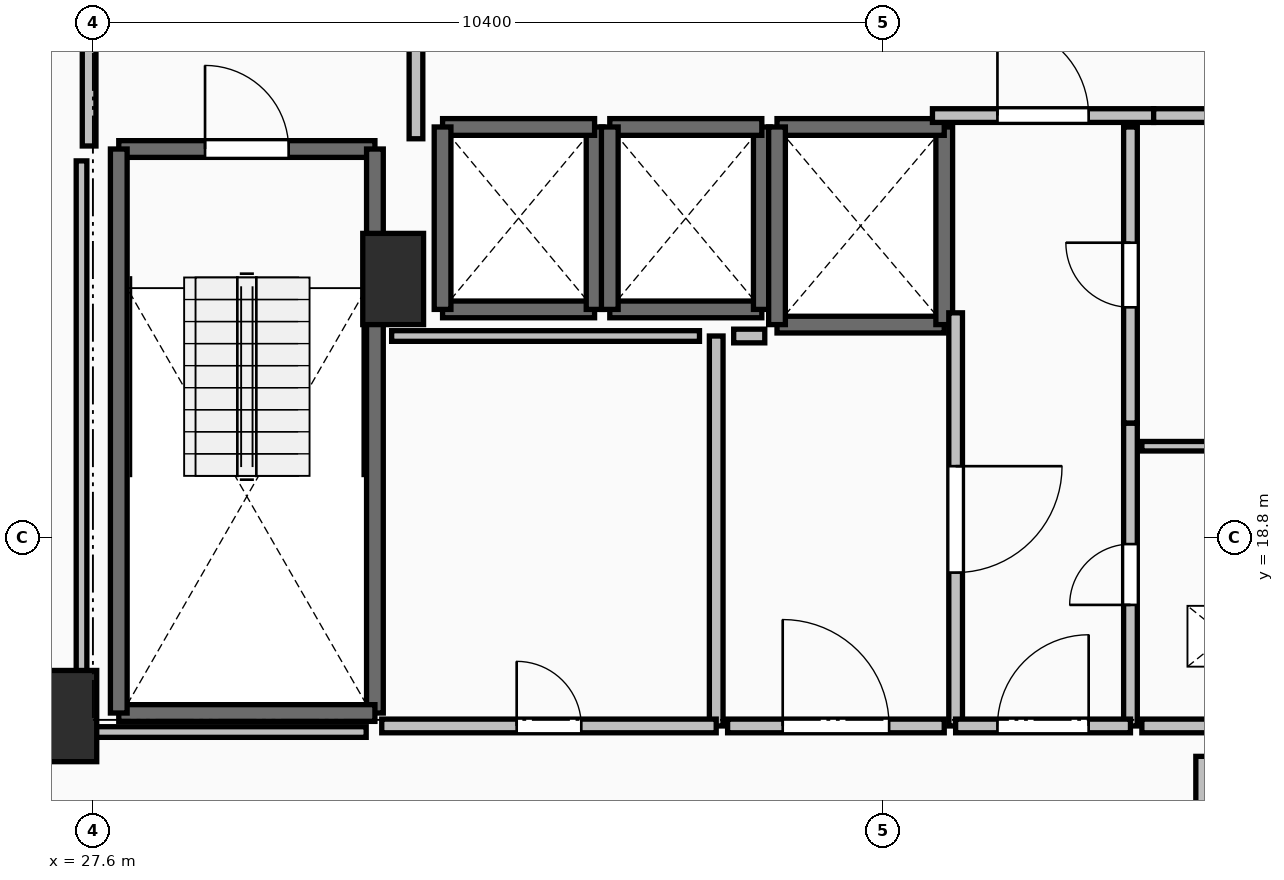
"""IFC4 building model, lengths in metres.
Left out: names, types, materials, properties, quantities, classifications, styles, units other than length and angle.
Written with IfcOpenShell. Run it as: python <this file> out.ifc"""

import sys

from ifc_helpers import new_model, si_unit, direction, frame, frame_2d, origin, origin_2d, place, context, subcontext, project, spatial, rectangle, extrude, element, fill, save


model = new_model("IFC4")
c1 = context("Model", 3, precision=1e-05, world=origin(), true_north=direction((0.0, 1.0)))
c2 = subcontext(c1, "Body", "Model", "MODEL_VIEW")
j1 = project(units=[si_unit("LENGTHUNIT", "METRE"), si_unit("PLANEANGLEUNIT", "RADIAN")], contexts=[c1])
p1 = place(None, origin())
s1 = spatial("IfcSite", under=j1, at=p1, CompositionType="ELEMENT")
p2 = place(p1, origin())
s2 = spatial("IfcBuilding", under=s1, at=p2, CompositionType="ELEMENT")
p3 = place(p2, frame((0.0, 0.0, 52.0)))
s3 = spatial("IfcBuildingStorey", under=s2, at=p3, CompositionType="ELEMENT", Elevation=52.0)
for number, where, z_axis, x_axis in (
    (1, (27.25, 16.45, 0.0), (0.0, 0.0, 1.0), (1.0, 0.0, 0.0)),
    (2, (31.55, 22.2, 0.0), (0.0, 0.0, 1.0), (1.0, 0.0, 0.0)),
):
    element("IfcColumn", number, at=place(p3, frame(where, z_axis=z_axis, x_axis=x_axis)), inside=s3, PredefinedType="PILASTER", context=c2, shape_type="SweptSolid", body=[
        extrude(rectangle(XDim=0.8, YDim=1.2, at=origin_2d()), origin(), (0.0, 0.0, 1.0), 3.5),
    ])
p4 = place(p3, frame((27.94, 23.91, 0.0), z_axis=(0.0, 0.0, 1.0), x_axis=(1.0, 0.0, 0.0)))
e3 = element("IfcWall", 3, at=p4, inside=s3, PredefinedType="SOLIDWALL", context=c2, shape_type="SweptSolid", body=[
    extrude(rectangle(XDim=3.37, YDim=0.22, at=frame_2d((1.685, 0.0))), origin(), (0.0, 0.0, 1.0), 3.24),
])
p5 = place(p4, frame((1.135, 0.0, 0.0)))
e4 = element("IfcOpeningElement", 4, at=p5, cuts=e3, PredefinedType="OPENING", context=c2, shape_type="SweptSolid", body=[
    extrude(rectangle(XDim=1.1, YDim=2.15, at=frame_2d((0.55, 1.075))), frame((0.0, 0.125, 0.0), z_axis=(0.0, -1.0, 0.0), x_axis=(1.0, 0.0, 0.0)), (0.0, 0.0, 1.0), 0.25),
])
p6 = place(p3, frame((31.31, 23.91, 0.0), z_axis=(0.0, 0.0, 1.0), x_axis=(0.0, -1.0, 0.0)))
e5 = element("IfcWall", 5, at=p6, inside=s3, PredefinedType="SOLIDWALL", context=c2, shape_type="SweptSolid", body=[
    extrude(rectangle(XDim=7.42, YDim=0.22, at=frame_2d((3.71, 0.0))), origin(), (0.0, 0.0, 1.0), 3.24),
])
p7 = place(p3, frame((31.31, 16.49, 0.0), z_axis=(0.0, 0.0, 1.0), x_axis=(-1.0, 0.0, 0.0)))
e6 = element("IfcWall", 6, at=p7, inside=s3, PredefinedType="SOLIDWALL", context=c2, shape_type="SweptSolid", body=[
    extrude(rectangle(XDim=3.37, YDim=0.22, at=frame_2d((1.685, 0.0))), origin(), (0.0, 0.0, 1.0), 3.24),
])
p8 = place(p3, frame((27.94, 16.49, 0.0), z_axis=(0.0, 0.0, 1.0), x_axis=(0.0, 1.0, 0.0)))
e7 = element("IfcWall", 7, at=p8, inside=s3, PredefinedType="SOLIDWALL", context=c2, shape_type="SweptSolid", body=[
    extrude(rectangle(XDim=7.42, YDim=0.22, at=frame_2d((3.71, 0.0))), origin(), (0.0, 0.0, 1.0), 3.24),
])
p9 = place(p3, frame((32.2, 21.8, 0.0), z_axis=(0.0, 0.0, 1.0), x_axis=(1.0, 0.0, 0.0)))
e8 = element("IfcWall", 8, at=p9, inside=s3, PredefinedType="SOLIDWALL", context=c2, shape_type="SweptSolid", body=[
    extrude(rectangle(XDim=2.0, YDim=0.22, at=frame_2d((1.0, 0.0))), origin(), (0.0, 0.0, 1.0), 3.24),
])
p10 = place(p3, frame((34.2, 21.8, 0.0), z_axis=(0.0, 0.0, 1.0), x_axis=(0.0, 1.0, 0.0)))
e9 = element("IfcWall", 9, at=p10, inside=s3, PredefinedType="SOLIDWALL", context=c2, shape_type="SweptSolid", body=[
    extrude(rectangle(XDim=2.4, YDim=0.22, at=frame_2d((1.2, 0.0))), origin(), (0.0, 0.0, 1.0), 3.24),
])
p11 = place(p3, frame((34.2, 24.2, 0.0), z_axis=(0.0, 0.0, 1.0), x_axis=(-1.0, 0.0, 0.0)))
e10 = element("IfcWall", 10, at=p11, inside=s3, PredefinedType="SOLIDWALL", context=c2, shape_type="SweptSolid", body=[
    extrude(rectangle(XDim=2.0, YDim=0.22, at=frame_2d((1.0, 0.0))), origin(), (0.0, 0.0, 1.0), 3.24),
])
p12 = place(p3, frame((32.2, 24.2, 0.0), z_axis=(0.0, 0.0, 1.0), x_axis=(0.0, -1.0, 0.0)))
e11 = element("IfcWall", 11, at=p12, inside=s3, PredefinedType="SOLIDWALL", context=c2, shape_type="SweptSolid", body=[
    extrude(rectangle(XDim=2.4, YDim=0.22, at=frame_2d((1.2, 0.0))), origin(), (0.0, 0.0, 1.0), 3.24),
])
p13 = place(p3, frame((34.4, 21.8, 0.0), z_axis=(0.0, 0.0, 1.0), x_axis=(1.0, 0.0, 0.0)))
e12 = element("IfcWall", 12, at=p13, inside=s3, PredefinedType="SOLIDWALL", context=c2, shape_type="SweptSolid", body=[
    extrude(rectangle(XDim=2.0, YDim=0.22, at=frame_2d((1.0, 0.0))), origin(), (0.0, 0.0, 1.0), 3.24),
])
p14 = place(p3, frame((36.4, 21.8, 0.0), z_axis=(0.0, 0.0, 1.0), x_axis=(0.0, 1.0, 0.0)))
e13 = element("IfcWall", 13, at=p14, inside=s3, PredefinedType="SOLIDWALL", context=c2, shape_type="SweptSolid", body=[
    extrude(rectangle(XDim=2.4, YDim=0.22, at=frame_2d((1.2, 0.0))), origin(), (0.0, 0.0, 1.0), 3.24),
])
p15 = place(p3, frame((36.4, 24.2, 0.0), z_axis=(0.0, 0.0, 1.0), x_axis=(-1.0, 0.0, 0.0)))
e14 = element("IfcWall", 14, at=p15, inside=s3, PredefinedType="SOLIDWALL", context=c2, shape_type="SweptSolid", body=[
    extrude(rectangle(XDim=2.0, YDim=0.22, at=frame_2d((1.0, 0.0))), origin(), (0.0, 0.0, 1.0), 3.24),
])
p16 = place(p3, frame((34.4, 24.2, 0.0), z_axis=(0.0, 0.0, 1.0), x_axis=(0.0, -1.0, 0.0)))
e15 = element("IfcWall", 15, at=p16, inside=s3, PredefinedType="SOLIDWALL", context=c2, shape_type="SweptSolid", body=[
    extrude(rectangle(XDim=2.4, YDim=0.22, at=frame_2d((1.2, 0.0))), origin(), (0.0, 0.0, 1.0), 3.24),
])
p17 = place(p3, frame((36.6, 21.6, 0.0), z_axis=(0.0, 0.0, 1.0), x_axis=(1.0, 0.0, 0.0)))
e16 = element("IfcWall", 16, at=p17, inside=s3, PredefinedType="SOLIDWALL", context=c2, shape_type="SweptSolid", body=[
    extrude(rectangle(XDim=2.2, YDim=0.22, at=frame_2d((1.1, 0.0))), origin(), (0.0, 0.0, 1.0), 3.24),
])
p18 = place(p3, frame((38.8, 21.6, 0.0), z_axis=(0.0, 0.0, 1.0), x_axis=(0.0, 1.0, 0.0)))
e17 = element("IfcWall", 17, at=p18, inside=s3, PredefinedType="SOLIDWALL", context=c2, shape_type="SweptSolid", body=[
    extrude(rectangle(XDim=2.6, YDim=0.22, at=frame_2d((1.3, 0.0))), origin(), (0.0, 0.0, 1.0), 3.24),
])
p19 = place(p3, frame((38.8, 24.2, 0.0), z_axis=(0.0, 0.0, 1.0), x_axis=(-1.0, 0.0, 0.0)))
e18 = element("IfcWall", 18, at=p19, inside=s3, PredefinedType="SOLIDWALL", context=c2, shape_type="SweptSolid", body=[
    extrude(rectangle(XDim=2.2, YDim=0.22, at=frame_2d((1.1, 0.0))), origin(), (0.0, 0.0, 1.0), 3.24),
])
p20 = place(p3, frame((36.6, 24.2, 0.0), z_axis=(0.0, 0.0, 1.0), x_axis=(0.0, -1.0, 0.0)))
e19 = element("IfcWall", 19, at=p20, inside=s3, PredefinedType="SOLIDWALL", context=c2, shape_type="SweptSolid", body=[
    extrude(rectangle(XDim=2.6, YDim=0.22, at=frame_2d((1.3, 0.0))), origin(), (0.0, 0.0, 1.0), 3.24),
])
p21 = place(p3, frame((31.85, 24.045, 0.0), z_axis=(0.0, 0.0, 1.0), x_axis=(0.0, 1.0, 0.0)))
e20 = element("IfcWall", 20, at=p21, inside=s3, PredefinedType="PARTITIONING", context=c2, shape_type="SweptSolid", body=[
    extrude(rectangle(XDim=3.91, YDim=0.18, at=frame_2d((1.955, 0.0))), origin(), (0.0, 0.0, 1.0), 3.24),
])
p22 = place(p21, frame((1.355, 0.0, 0.0)))
e21 = element("IfcOpeningElement", 21, at=p22, cuts=e20, PredefinedType="OPENING", context=c2, shape_type="SweptSolid", body=[
    extrude(rectangle(XDim=1.2, YDim=2.15, at=frame_2d((0.6, 1.075))), frame((0.0, 0.105, 0.0), z_axis=(0.0, -1.0, 0.0), x_axis=(1.0, 0.0, 0.0)), (0.0, 0.0, 1.0), 0.21),
])
p23 = place(p3, frame((27.55, 28.0, 0.0), z_axis=(0.0, 0.0, 1.0), x_axis=(0.0, -1.0, 0.0)))
e22 = element("IfcWall", 22, at=p23, inside=s3, PredefinedType="PARTITIONING", context=c2, shape_type="SweptSolid", body=[
    extrude(rectangle(XDim=4.05, YDim=0.18, at=frame_2d((2.025, 0.0))), origin(), (0.0, 0.0, 1.0), 3.24),
])
p24 = place(p23, frame((1.425, 0.0, 0.0)))
e23 = element("IfcOpeningElement", 23, at=p24, cuts=e22, PredefinedType="OPENING", context=c2, shape_type="SweptSolid", body=[
    extrude(rectangle(XDim=1.2, YDim=2.15, at=frame_2d((0.6, 1.075))), frame((0.0, 0.105, 0.0), z_axis=(0.0, -1.0, 0.0), x_axis=(1.0, 0.0, 0.0)), (0.0, 0.0, 1.0), 0.21),
])
p25 = place(p3, frame((38.645, 24.35, 0.0), z_axis=(0.0, 0.0, 1.0), x_axis=(1.0, 0.0, 0.0)))
e24 = element("IfcWall", 24, at=p25, inside=s3, PredefinedType="PARTITIONING", context=c2, shape_type="SweptSolid", body=[
    extrude(rectangle(XDim=2.91, YDim=0.18, at=frame_2d((1.455, 0.0))), origin(), (0.0, 0.0, 1.0), 3.24),
])
p26 = place(p25, frame((0.855, 0.0, 0.0)))
e25 = element("IfcOpeningElement", 25, at=p26, cuts=e24, PredefinedType="OPENING", context=c2, shape_type="SweptSolid", body=[
    extrude(rectangle(XDim=1.2, YDim=2.15, at=frame_2d((0.6, 1.075))), frame((0.0, 0.105, 0.0), z_axis=(0.0, -1.0, 0.0), x_axis=(1.0, 0.0, 0.0)), (0.0, 0.0, 1.0), 0.21),
])
p27 = place(p3, frame((41.555, 24.35, 0.0), z_axis=(0.0, 0.0, 1.0), x_axis=(1.0, 0.0, 0.0)))
e26 = element("IfcWall", 26, at=p27, inside=s3, PredefinedType="PARTITIONING", context=c2, shape_type="SweptSolid", body=[
    extrude(rectangle(XDim=2.445, YDim=0.18, at=frame_2d((1.223, 0.0))), origin(), (0.0, 0.0, 1.0), 3.24),
])
p28 = place(p27, frame((0.798, 0.0, 0.0)))
e27 = element("IfcOpeningElement", 27, at=p28, cuts=e26, PredefinedType="OPENING", context=c2, shape_type="SweptSolid", body=[
    extrude(rectangle(XDim=0.85, YDim=2.1, at=frame_2d((0.425, 1.05))), frame((0.0, 0.105, 0.0), z_axis=(0.0, -1.0, 0.0), x_axis=(1.0, 0.0, 0.0)), (0.0, 0.0, 1.0), 0.21),
])
p29 = place(p3, frame((41.25, 16.32, 0.0), z_axis=(0.0, 0.0, 1.0), x_axis=(0.0, 1.0, 0.0)))
e28 = element("IfcWall", 28, at=p29, inside=s3, PredefinedType="PARTITIONING", context=c2, shape_type="SweptSolid", body=[
    extrude(rectangle(XDim=3.985, YDim=0.18, at=frame_2d((1.992, 0.0))), origin(), (0.0, 0.0, 1.0), 3.24),
])
p30 = place(p29, frame((1.593, 0.0, 0.0)))
e29 = element("IfcOpeningElement", 29, at=p30, cuts=e28, PredefinedType="OPENING", context=c2, shape_type="SweptSolid", body=[
    extrude(rectangle(XDim=0.8, YDim=2.05, at=frame_2d((0.4, 1.025))), frame((0.0, 0.105, 0.0), z_axis=(0.0, -1.0, 0.0), x_axis=(1.0, 0.0, 0.0)), (0.0, 0.0, 1.0), 0.21),
])
p31 = place(p3, frame((41.25, 20.305, 0.0), z_axis=(0.0, 0.0, 1.0), x_axis=(0.0, 1.0, 0.0)))
e30 = element("IfcWall", 30, at=p31, inside=s3, PredefinedType="PARTITIONING", context=c2, shape_type="SweptSolid", body=[
    extrude(rectangle(XDim=3.895, YDim=0.18, at=frame_2d((1.948, 0.0))), origin(), (0.0, 0.0, 1.0), 3.24),
])
p32 = place(p31, frame((1.522, 0.0, 0.0)))
e31 = element("IfcOpeningElement", 31, at=p32, cuts=e30, PredefinedType="OPENING", context=c2, shape_type="SweptSolid", body=[
    extrude(rectangle(XDim=0.85, YDim=2.1, at=frame_2d((0.425, 1.05))), frame((0.0, 0.105, 0.0), z_axis=(0.0, -1.0, 0.0), x_axis=(1.0, 0.0, 0.0)), (0.0, 0.0, 1.0), 0.21),
])
p33 = place(p3, frame((38.95, 21.755, 0.0), z_axis=(0.0, 0.0, 1.0), x_axis=(0.0, -1.0, 0.0)))
e32 = element("IfcWall", 32, at=p33, inside=s3, PredefinedType="PARTITIONING", context=c2, shape_type="SweptSolid", body=[
    extrude(rectangle(XDim=5.435, YDim=0.18, at=frame_2d((2.717, 0.0))), origin(), (0.0, 0.0, 1.0), 3.24),
])
p34 = place(p33, frame((2.018, 0.0, 0.0)))
e33 = element("IfcOpeningElement", 33, at=p34, cuts=e32, PredefinedType="OPENING", context=c2, shape_type="SweptSolid", body=[
    extrude(rectangle(XDim=1.4, YDim=2.2, at=frame_2d((0.7, 1.1))), frame((0.0, 0.105, 0.0), z_axis=(0.0, -1.0, 0.0), x_axis=(1.0, 0.0, 0.0)), (0.0, 0.0, 1.0), 0.21),
])
p35 = place(p3, frame((38.95, 16.32, 0.0), z_axis=(0.0, 0.0, 1.0), x_axis=(1.0, 0.0, 0.0)))
e34 = element("IfcWall", 34, at=p35, inside=s3, PredefinedType="PARTITIONING", context=c2, shape_type="SweptSolid", body=[
    extrude(rectangle(XDim=2.3, YDim=0.18, at=frame_2d((1.15, 0.0))), origin(), (0.0, 0.0, 1.0), 3.24),
])
p36 = place(p35, frame((0.55, 0.0, 0.0)))
e35 = element("IfcOpeningElement", 35, at=p36, cuts=e34, PredefinedType="OPENING", context=c2, shape_type="SweptSolid", body=[
    extrude(rectangle(XDim=1.2, YDim=2.15, at=frame_2d((0.6, 1.075))), frame((0.0, 0.105, 0.0), z_axis=(0.0, -1.0, 0.0), x_axis=(1.0, 0.0, 0.0)), (0.0, 0.0, 1.0), 0.21),
])
p37 = place(p3, frame((44.6, 20.0, 0.0), z_axis=(0.0, 0.0, 1.0), x_axis=(-1.0, 0.0, 0.0)))
e36 = element("IfcWall", 36, at=p37, inside=s3, PredefinedType="PARTITIONING", context=c2, shape_type="SweptSolid", body=[
    extrude(rectangle(XDim=3.2, YDim=0.125, at=frame_2d((1.6, 0.0))), origin(), (0.0, 0.0, 1.0), 3.24),
])
p38 = place(p3, frame((41.4, 16.32, 0.0), z_axis=(0.0, 0.0, 1.0), x_axis=(1.0, 0.0, 0.0)))
e37 = element("IfcWall", 37, at=p38, inside=s3, PredefinedType="PARTITIONING", context=c2, shape_type="SweptSolid", body=[
    extrude(rectangle(XDim=3.2, YDim=0.18, at=frame_2d((1.6, 0.0))), origin(), (0.0, 0.0, 1.0), 3.24),
])
p39 = place(p38, frame((1.2, 0.0, 0.0)))
e38 = element("IfcOpeningElement", 38, at=p39, cuts=e37, PredefinedType="OPENING", context=c2, shape_type="SweptSolid", body=[
    extrude(rectangle(XDim=0.8, YDim=2.05, at=frame_2d((0.4, 1.025))), frame((0.0, 0.105, 0.0), z_axis=(0.0, -1.0, 0.0), x_axis=(1.0, 0.0, 0.0)), (0.0, 0.0, 1.0), 0.21),
])
p40 = place(p3, frame((35.8, 16.32, 0.0), z_axis=(0.0, 0.0, 1.0), x_axis=(0.0, 1.0, 0.0)))
e39 = element("IfcWall", 39, at=p40, inside=s3, PredefinedType="PARTITIONING", context=c2, shape_type="SweptSolid", body=[
    extrude(rectangle(XDim=5.13, YDim=0.18, at=frame_2d((2.565, 0.0))), origin(), (0.0, 0.0, 1.0), 3.24),
])
p41 = place(p3, frame((31.4, 16.32, 0.0), z_axis=(0.0, 0.0, 1.0), x_axis=(1.0, 0.0, 0.0)))
e40 = element("IfcWall", 40, at=p41, inside=s3, PredefinedType="PARTITIONING", context=c2, shape_type="SweptSolid", body=[
    extrude(rectangle(XDim=4.4, YDim=0.18, at=frame_2d((2.2, 0.0))), origin(), (0.0, 0.0, 1.0), 3.24),
])
p42 = place(p41, frame((1.775, 0.0, 0.0)))
e41 = element("IfcOpeningElement", 41, at=p42, cuts=e40, PredefinedType="OPENING", context=c2, shape_type="SweptSolid", body=[
    extrude(rectangle(XDim=0.85, YDim=2.1, at=frame_2d((0.425, 1.05))), frame((0.0, 0.105, 0.0), z_axis=(0.0, -1.0, 0.0), x_axis=(1.0, 0.0, 0.0)), (0.0, 0.0, 1.0), 0.21),
])
p43 = place(p3, frame((35.95, 16.32, 0.0), z_axis=(0.0, 0.0, 1.0), x_axis=(1.0, 0.0, 0.0)))
e42 = element("IfcWall", 42, at=p43, inside=s3, PredefinedType="PARTITIONING", context=c2, shape_type="SweptSolid", body=[
    extrude(rectangle(XDim=2.85, YDim=0.18, at=frame_2d((1.425, 0.0))), origin(), (0.0, 0.0, 1.0), 3.24),
])
p44 = place(p43, frame((0.725, 0.0, 0.0)))
e43 = element("IfcOpeningElement", 43, at=p44, cuts=e42, PredefinedType="OPENING", context=c2, shape_type="SweptSolid", body=[
    extrude(rectangle(XDim=1.4, YDim=2.2, at=frame_2d((0.7, 1.1))), frame((0.0, 0.105, 0.0), z_axis=(0.0, -1.0, 0.0), x_axis=(1.0, 0.0, 0.0)), (0.0, 0.0, 1.0), 0.21),
])
p45 = place(p3, frame((42.2, 14.1, 0.0), z_axis=(0.0, 0.0, 1.0), x_axis=(0.0, 1.0, 0.0)))
e44 = element("IfcWall", 44, at=p45, inside=s3, PredefinedType="PARTITIONING", context=c2, shape_type="SweptSolid", body=[
    extrude(rectangle(XDim=1.82, YDim=0.18, at=frame_2d((0.91, 0.0))), origin(), (0.0, 0.0, 1.0), 3.24),
])
p46 = place(p3, frame((35.58, 21.45, 0.0), z_axis=(0.0, 0.0, 1.0), x_axis=(-1.0, 0.0, 0.0)))
e45 = element("IfcWall", 45, at=p46, inside=s3, PredefinedType="PARTITIONING", context=c2, shape_type="SweptSolid", body=[
    extrude(rectangle(XDim=4.05, YDim=0.14, at=frame_2d((2.025, 0.0))), origin(), (0.0, 0.0, 1.0), 3.24),
])
p47 = place(p3, frame((36.439, 21.45, 0.0), z_axis=(0.0, 0.0, 1.0), x_axis=(-1.0, 0.0, 0.0)))
e46 = element("IfcWall", 46, at=p47, inside=s3, PredefinedType="PARTITIONING", context=c2, shape_type="SweptSolid", body=[
    extrude(rectangle(XDim=0.409, YDim=0.18, at=frame_2d((0.205, 0.0))), origin(), (0.0, 0.0, 1.0), 3.24),
])
p48 = place(p3, frame((31.195, 16.24, 0.0), z_axis=(0.0, 0.0, 1.0), x_axis=(-1.0, 0.0, 0.0)))
e47 = element("IfcWall", 47, at=p48, inside=s3, PredefinedType="PARTITIONING", context=c2, shape_type="SweptSolid", body=[
    extrude(rectangle(XDim=3.745, YDim=0.14, at=frame_2d((1.873, 0.0))), origin(), (0.0, 0.0, 1.0), 2.432),
])
p49 = place(p3, frame((27.45, 16.24, 0.0), z_axis=(0.0, 0.0, 1.0), x_axis=(0.0, 1.0, 0.0)))
e48 = element("IfcWall", 48, at=p49, inside=s3, PredefinedType="PARTITIONING", context=c2, shape_type="SweptSolid", body=[
    extrude(rectangle(XDim=7.514, YDim=0.14, at=frame_2d((3.757, 0.0))), origin(), (0.0, 0.0, 1.0), 2.432),
])
p50 = place(p5, origin())
e49 = element("IfcDoor", 49, at=p50, inside=s3, OperationType="SINGLE_SWING_LEFT", PredefinedType="DOOR", context=c2, shape_type="SweptSolid", body=[
    extrude(rectangle(XDim=1.1, YDim=2.15, at=frame_2d((0.55, 1.075))), frame((0.0, 0.025, 0.0), z_axis=(0.0, -1.0, 0.0), x_axis=(1.0, 0.0, 0.0)), (0.0, 0.0, 1.0), 0.05),
])
fill(e4, e49)
p51 = place(p26, origin())
e50 = element("IfcDoor", 50, at=p51, inside=s3, OperationType="SINGLE_SWING_LEFT", PredefinedType="DOOR", context=c2, shape_type="SweptSolid", body=[
    extrude(rectangle(XDim=1.2, YDim=2.15, at=frame_2d((0.6, 1.075))), frame((0.0, 0.025, 0.0), z_axis=(0.0, -1.0, 0.0), x_axis=(1.0, 0.0, 0.0)), (0.0, 0.0, 1.0), 0.05),
])
fill(e25, e50)
p52 = place(p30, origin())
e51 = element("IfcDoor", 51, at=p52, inside=s3, OperationType="SINGLE_SWING_LEFT", PredefinedType="DOOR", context=c2, shape_type="SweptSolid", body=[
    extrude(rectangle(XDim=0.8, YDim=2.05, at=frame_2d((0.4, 1.025))), frame((0.0, 0.025, 0.0), z_axis=(0.0, -1.0, 0.0), x_axis=(1.0, 0.0, 0.0)), (0.0, 0.0, 1.0), 0.05),
])
fill(e29, e51)
p53 = place(p32, origin())
e52 = element("IfcDoor", 52, at=p53, inside=s3, OperationType="SINGLE_SWING_RIGHT", PredefinedType="DOOR", context=c2, shape_type="SweptSolid", body=[
    extrude(rectangle(XDim=0.85, YDim=2.1, at=frame_2d((0.425, 1.05))), frame((0.0, 0.025, 0.0), z_axis=(0.0, -1.0, 0.0), x_axis=(1.0, 0.0, 0.0)), (0.0, 0.0, 1.0), 0.05),
])
fill(e31, e52)
p54 = place(p34, origin())
e53 = element("IfcDoor", 53, at=p54, inside=s3, OperationType="DOUBLE_SWING_LEFT", PredefinedType="DOOR", context=c2, shape_type="SweptSolid", body=[
    extrude(rectangle(XDim=1.4, YDim=2.2, at=frame_2d((0.7, 1.1))), frame((0.0, 0.025, 0.0), z_axis=(0.0, -1.0, 0.0), x_axis=(1.0, 0.0, 0.0)), (0.0, 0.0, 1.0), 0.05),
])
fill(e33, e53)
p55 = place(p36, origin())
e54 = element("IfcDoor", 54, at=p55, inside=s3, OperationType="SINGLE_SWING_RIGHT", PredefinedType="DOOR", context=c2, shape_type="SweptSolid", body=[
    extrude(rectangle(XDim=1.2, YDim=2.15, at=frame_2d((0.6, 1.075))), frame((0.0, 0.025, 0.0), z_axis=(0.0, -1.0, 0.0), x_axis=(1.0, 0.0, 0.0)), (0.0, 0.0, 1.0), 0.05),
])
fill(e35, e54)
p56 = place(p42, origin())
e55 = element("IfcDoor", 55, at=p56, inside=s3, OperationType="SINGLE_SWING_LEFT", PredefinedType="DOOR", context=c2, shape_type="SweptSolid", body=[
    extrude(rectangle(XDim=0.85, YDim=2.1, at=frame_2d((0.425, 1.05))), frame((0.0, 0.025, 0.0), z_axis=(0.0, -1.0, 0.0), x_axis=(1.0, 0.0, 0.0)), (0.0, 0.0, 1.0), 0.05),
])
fill(e41, e55)
p57 = place(p44, origin())
e56 = element("IfcDoor", 56, at=p57, inside=s3, OperationType="DOUBLE_SWING_LEFT", PredefinedType="DOOR", context=c2, shape_type="SweptSolid", body=[
    extrude(rectangle(XDim=1.4, YDim=2.2, at=frame_2d((0.7, 1.1))), frame((0.0, 0.025, 0.0), z_axis=(0.0, -1.0, 0.0), x_axis=(1.0, 0.0, 0.0)), (0.0, 0.0, 1.0), 0.05),
])
fill(e43, e56)
save(model, sys.argv[1])
